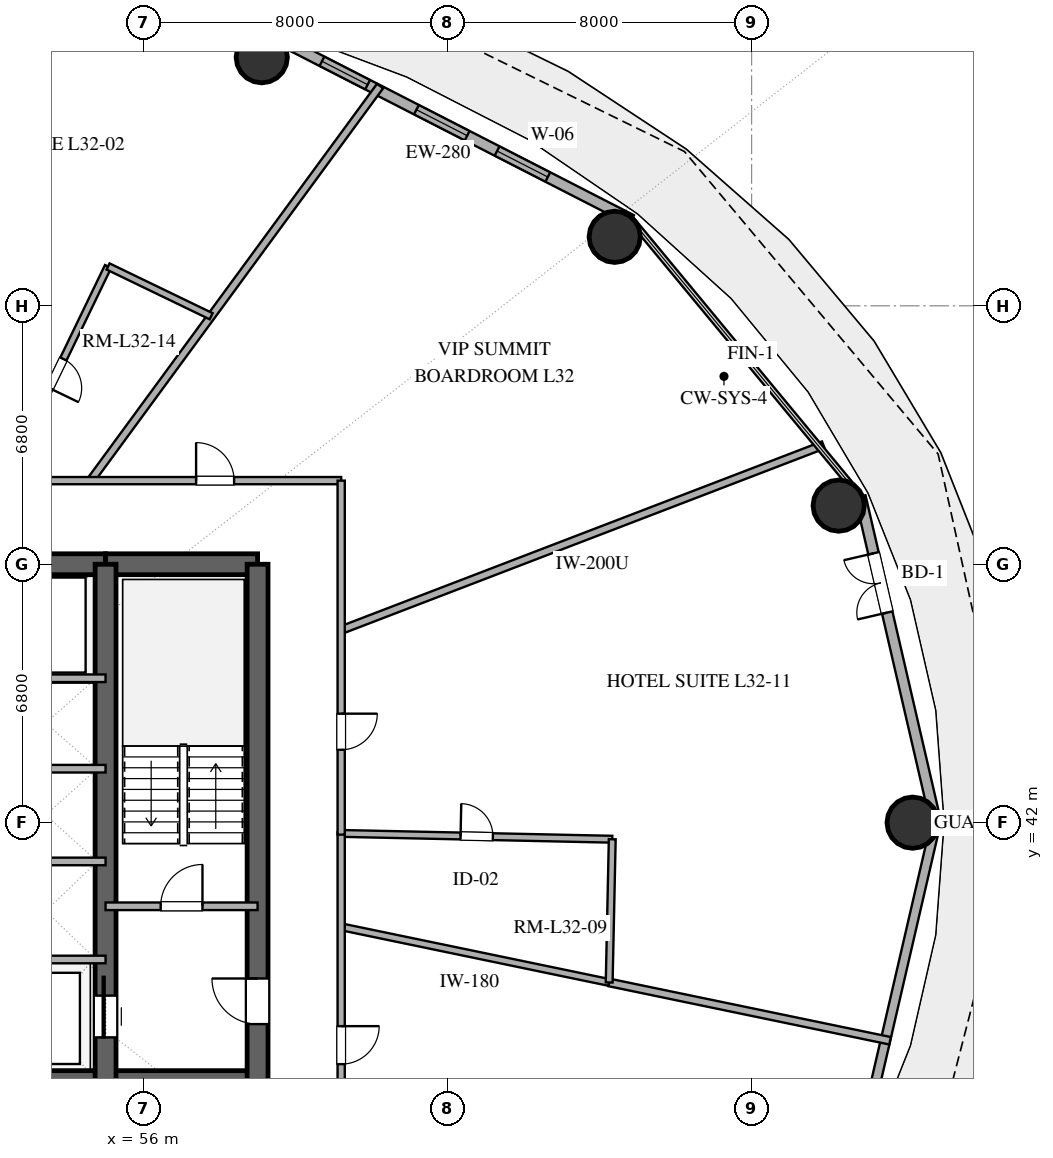
"""IFC4 building model, lengths in metres.
Left out: names, types, materials, properties, quantities, classifications, styles, units other than length and angle.
Written with IfcOpenShell. Run it as: python <this file> out.ifc"""

import sys

from ifc_helpers import new_model, si_unit, direction, frame, frame_2d, origin, origin_2d, place, context, subcontext, project, spatial, rectangle, hollow_circle, extrude, element, fill, save


model = new_model("IFC4")
c1 = context("Model", 3, precision=1e-05, world=origin(), true_north=direction((0.0, 1.0)))
c2 = subcontext(c1, "Body", "Model", "MODEL_VIEW")
j1 = project(units=[si_unit("LENGTHUNIT", "METRE"), si_unit("PLANEANGLEUNIT", "RADIAN")], contexts=[c1])
p1 = place(None, origin())
s1 = spatial("IfcSite", under=j1, at=p1, CompositionType="ELEMENT")
p2 = place(p1, origin())
s2 = spatial("IfcBuilding", under=s1, at=p2, CompositionType="ELEMENT")
p3 = place(p2, frame((0.0, 0.0, 127.2)))
s3 = spatial("IfcBuildingStorey", under=s2, at=p3, CompositionType="ELEMENT", Elevation=127.2)
p4 = place(p3, frame((41.0, 35.2, 0.0), z_axis=(0.0, 0.0, 1.0), x_axis=(1.0, 0.0, 0.0)))
e1 = element("IfcWall", 1, at=p4, inside=s3, PredefinedType="SHEAR", context=c2, shape_type="SweptSolid", body=[
    extrude(rectangle(XDim=14.0, YDim=0.55, at=frame_2d((7.0, 0.0))), origin(), (0.0, 0.0, 1.0), 3.38),
])
p5 = place(p4, frame((6.1, 0.0, 0.0)))
e2 = element("IfcOpeningElement", 2, at=p5, cuts=e1, PredefinedType="OPENING", context=c2, shape_type="SweptSolid", body=[
    extrude(rectangle(XDim=1.8, YDim=2.25, at=frame_2d((0.9, 1.125))), frame((0.0, 0.285, 0.0), z_axis=(0.0, -1.0, 0.0), x_axis=(1.0, 0.0, 0.0)), (0.0, 0.0, 1.0), 0.57),
])
p6 = place(p3, frame((55.0, 35.2, 0.0), z_axis=(0.0, 0.0, 1.0), x_axis=(1.0, 0.0, 0.0)))
e3 = element("IfcWall", 3, at=p6, inside=s3, PredefinedType="SHEAR", context=c2, shape_type="SweptSolid", body=[
    extrude(rectangle(XDim=4.0, YDim=0.55, at=frame_2d((2.0, 0.0))), origin(), (0.0, 0.0, 1.0), 3.38),
])
p7 = place(p3, frame((41.0, 48.8, 0.0), z_axis=(0.0, 0.0, 1.0), x_axis=(1.0, 0.0, 0.0)))
e4 = element("IfcWall", 4, at=p7, inside=s3, PredefinedType="SHEAR", context=c2, shape_type="SweptSolid", body=[
    extrude(rectangle(XDim=14.0, YDim=0.55, at=frame_2d((7.0, 0.0))), origin(), (0.0, 0.0, 1.0), 3.38),
])
p8 = place(p7, frame((6.1, 0.0, 0.0)))
e5 = element("IfcOpeningElement", 5, at=p8, cuts=e4, PredefinedType="OPENING", context=c2, shape_type="SweptSolid", body=[
    extrude(rectangle(XDim=1.8, YDim=2.25, at=frame_2d((0.9, 1.125))), frame((0.0, 0.285, 0.0), z_axis=(0.0, -1.0, 0.0), x_axis=(1.0, 0.0, 0.0)), (0.0, 0.0, 1.0), 0.57),
])
p9 = place(p3, frame((55.0, 48.8, 0.0), z_axis=(0.0, 0.0, 1.0), x_axis=(1.0, 0.0, 0.0)))
e6 = element("IfcWall", 6, at=p9, inside=s3, PredefinedType="SHEAR", context=c2, shape_type="SweptSolid", body=[
    extrude(rectangle(XDim=4.0, YDim=0.55, at=frame_2d((2.0, 0.0))), origin(), (0.0, 0.0, 1.0), 3.38),
])
p10 = place(p3, frame((59.0, 35.2, 0.0), z_axis=(0.0, 0.0, 1.0), x_axis=(0.0, 1.0, 0.0)))
e7 = element("IfcWall", 7, at=p10, inside=s3, PredefinedType="SHEAR", context=c2, shape_type="SweptSolid", body=[
    extrude(rectangle(XDim=13.6, YDim=0.55, at=frame_2d((6.8, 0.0))), origin(), (0.0, 0.0, 1.0), 3.38),
])
p11 = place(p10, frame((1.5, 0.0, 0.0)))
e8 = element("IfcOpeningElement", 8, at=p11, cuts=e7, PredefinedType="OPENING", context=c2, shape_type="SweptSolid", body=[
    extrude(rectangle(XDim=1.2, YDim=2.15, at=frame_2d((0.6, 1.075))), frame((0.0, 0.285, 0.0), z_axis=(0.0, -1.0, 0.0), x_axis=(1.0, 0.0, 0.0)), (0.0, 0.0, 1.0), 0.57),
])
p12 = place(p3, frame((55.0, 35.2, 0.0), z_axis=(0.0, 0.0, 1.0), x_axis=(0.0, 1.0, 0.0)))
e9 = element("IfcWall", 9, at=p12, inside=s3, PredefinedType="SHEAR", context=c2, shape_type="SweptSolid", body=[
    extrude(rectangle(XDim=13.6, YDim=0.55, at=frame_2d((6.8, 0.0))), origin(), (0.0, 0.0, 1.0), 3.38),
])
p13 = place(p12, frame((1.15, 0.0, 0.0)))
e10 = element("IfcOpeningElement", 10, at=p13, cuts=e9, PredefinedType="OPENING", context=c2, shape_type="SweptSolid", body=[
    extrude(rectangle(XDim=1.1, YDim=2.2, at=frame_2d((0.55, 1.1))), frame((0.0, 0.285, 0.0), z_axis=(0.0, -1.0, 0.0), x_axis=(1.0, 0.0, 0.0)), (0.0, 0.0, 1.0), 0.57),
])
for number, where, z_axis, x_axis in (
    (11, (76.237, 42.0, 0.0), (0.0, 0.0, 1.0), (1.0, 0.0, 0.0)),
    (12, (74.291, 50.343, 0.0), (0.0, 0.0, 1.0), (1.0, 0.0, 0.0)),
    (13, (68.398, 57.415, 0.0), (0.0, 0.0, 1.0), (1.0, 0.0, 0.0)),
    (14, (59.11, 62.141, 0.0), (0.0, 0.0, 1.0), (1.0, 0.0, 0.0)),
):
    element("IfcColumn", number, at=place(p3, frame(where, z_axis=z_axis, x_axis=x_axis)), inside=s3, PredefinedType="COLUMN", context=c2, shape_type="SweptSolid", body=[
        extrude(hollow_circle(Radius=0.675, WallThickness=0.036, at=origin_2d()), origin(), (0.0, 0.0, 1.0), 3.38),
    ])
p14 = place(p3, frame((76.849, 42.0, 0.0), z_axis=(0.0, 0.0, 1.0), x_axis=(-0.22558597182, 0.974223264616, 0.0)))
e15 = element("IfcWall", 15, at=p14, inside=s3, PredefinedType="SOLIDWALL", context=c2, shape_type="SweptSolid", body=[
    extrude(rectangle(XDim=8.811, YDim=0.28, at=frame_2d((4.405, 0.0))), origin(), (0.0, 0.0, 1.0), 3.38),
])
p15 = place(p14, frame((5.675, 0.0, 0.0)))
e16 = element("IfcOpeningElement", 16, at=p15, cuts=e15, PredefinedType="OPENING", context=c2, shape_type="SweptSolid", body=[
    extrude(rectangle(XDim=1.6, YDim=2.25, at=frame_2d((0.8, 1.125))), frame((0.0, 0.15, 0.0), z_axis=(0.0, -1.0, 0.0), x_axis=(1.0, 0.0, 0.0)), (0.0, 0.0, 1.0), 0.3),
])
p16 = place(p3, frame((68.84, 57.86, 0.0), z_axis=(0.0, 0.0, 1.0), x_axis=(-0.889959505023, 0.45603955905, 0.0)))
e17 = element("IfcWall", 17, at=p16, inside=s3, PredefinedType="SOLIDWALL", context=c2, shape_type="SweptSolid", body=[
    extrude(rectangle(XDim=10.662, YDim=0.28, at=frame_2d((5.331, 0.0))), origin(), (0.0, 0.0, 1.0), 3.38),
])
p17 = place(p16, frame((2.475, 0.0, 0.85)))
e18 = element("IfcOpeningElement", 18, at=p17, cuts=e17, PredefinedType="OPENING", context=c2, shape_type="SweptSolid", body=[
    extrude(rectangle(XDim=1.5, YDim=2.0, at=frame_2d((0.75, 1.0))), frame((0.0, 0.15, 0.0), z_axis=(0.0, -1.0, 0.0), x_axis=(1.0, 0.0, 0.0)), (0.0, 0.0, 1.0), 0.3),
])
p18 = place(p16, frame((4.86, 0.0, 0.85)))
e19 = element("IfcOpeningElement", 19, at=p18, cuts=e17, PredefinedType="OPENING", context=c2, shape_type="SweptSolid", body=[
    extrude(rectangle(XDim=1.5, YDim=2.0, at=frame_2d((0.75, 1.0))), frame((0.0, 0.15, 0.0), z_axis=(0.0, -1.0, 0.0), x_axis=(1.0, 0.0, 0.0)), (0.0, 0.0, 1.0), 0.3),
])
p19 = place(p16, frame((7.803, 0.0, 0.85)))
e20 = element("IfcOpeningElement", 20, at=p19, cuts=e17, PredefinedType="OPENING", context=c2, shape_type="SweptSolid", body=[
    extrude(rectangle(XDim=1.35, YDim=1.8, at=frame_2d((0.675, 0.9))), frame((0.0, 0.15, 0.0), z_axis=(0.0, -1.0, 0.0), x_axis=(1.0, 0.0, 0.0)), (0.0, 0.0, 1.0), 0.3),
])
p20 = place(p3, frame((74.861, 33.417, 0.0), z_axis=(0.0, 0.0, 1.0), x_axis=(0.22558597182, 0.974223264616, 0.0)))
e21 = element("IfcWall", 21, at=p20, inside=s3, PredefinedType="SOLIDWALL", context=c2, shape_type="SweptSolid", body=[
    extrude(rectangle(XDim=8.811, YDim=0.25, at=frame_2d((4.405, 0.0))), origin(), (0.0, 0.0, 1.0), 3.38),
])
p21 = place(p3, frame((55.0, 39.8, 0.0), z_axis=(0.0, 0.0, 1.0), x_axis=(1.0, 0.0, 0.0)))
e22 = element("IfcWall", 22, at=p21, inside=s3, PredefinedType="SOLIDWALL", context=c2, shape_type="SweptSolid", body=[
    extrude(rectangle(XDim=4.0, YDim=0.2, at=frame_2d((2.0, 0.0))), origin(), (0.0, 0.0, 1.0), 2.74),
])
p22 = place(p21, frame((1.45, 0.0, 0.0)))
e23 = element("IfcOpeningElement", 23, at=p22, cuts=e22, PredefinedType="OPENING", context=c2, shape_type="SweptSolid", body=[
    extrude(rectangle(XDim=1.1, YDim=2.15, at=frame_2d((0.55, 1.075))), frame((0.0, 0.11, 0.0), z_axis=(0.0, -1.0, 0.0), x_axis=(1.0, 0.0, 0.0)), (0.0, 0.0, 1.0), 0.22),
])
for number, where, z_axis, x_axis in (
    (24, (52.05, 38.4, 0.0), (0.0, 0.0, 1.0), (1.0, 0.0, 0.0)),
    (25, (52.05, 40.98, 0.0), (0.0, 0.0, 1.0), (1.0, 0.0, 0.0)),
    (26, (52.05, 43.42, 0.0), (0.0, 0.0, 1.0), (1.0, 0.0, 0.0)),
    (27, (52.05, 45.8, 0.0), (0.0, 0.0, 1.0), (1.0, 0.0, 0.0)),
):
    element("IfcWall", number, at=place(p3, frame(where, z_axis=z_axis, x_axis=x_axis)), inside=s3, PredefinedType="SOLIDWALL", context=c2, shape_type="SweptSolid", body=[
        extrude(rectangle(XDim=2.95, YDim=0.2, at=frame_2d((1.475, 0.0))), origin(), (0.0, 0.0, 1.0), 2.74),
    ])
p23 = place(p3, frame((73.888, 51.938, 0.0), z_axis=(0.0, 0.0, 1.0), x_axis=(-0.933575508152, -0.358380762009, 0.0)))
e28 = element("IfcWall", 28, at=p23, inside=s3, PredefinedType="PARTITIONING", context=c2, shape_type="SweptSolid", body=[
    extrude(rectangle(XDim=13.591, YDim=0.2, at=frame_2d((6.796, 0.0))), origin(), (0.0, 0.0, 1.0), 2.74),
])
p24 = place(p3, frame((75.643, 36.262, 0.0), z_axis=(0.0, 0.0, 1.0), x_axis=(-0.979129223201, 0.203238687937, 0.0)))
e29 = element("IfcWall", 29, at=p24, inside=s3, PredefinedType="PARTITIONING", context=c2, shape_type="SweptSolid", body=[
    extrude(rectangle(XDim=7.549, YDim=0.2, at=frame_2d((3.774, 0.0))), origin(), (0.0, 0.0, 1.0), 2.74),
])
p25 = place(p3, frame((54.605, 51.0, 0.0), z_axis=(0.0, 0.0, 1.0), x_axis=(0.591626609971, 0.806212102597, 0.0)))
e30 = element("IfcWall", 30, at=p25, inside=s3, PredefinedType="PARTITIONING", context=c2, shape_type="SweptSolid", body=[
    extrude(rectangle(XDim=12.879, YDim=0.2, at=frame_2d((6.439, 0.0))), origin(), (0.0, 0.0, 1.0), 2.74),
])
p26 = place(p3, frame((68.252, 37.796, 0.0), z_axis=(0.0, 0.0, 1.0), x_axis=(-0.979121746523, 0.20327470449, 0.0)))
e31 = element("IfcWall", 31, at=p26, inside=s3, PredefinedType="PLUMBINGWALL", context=c2, shape_type="SweptSolid", body=[
    extrude(rectangle(XDim=7.203, YDim=0.18, at=frame_2d((3.601, 0.0))), origin(), (0.0, 0.0, 1.0), 2.74),
])
p27 = place(p3, frame((61.2, 41.717, 0.0), z_axis=(0.0, 0.0, 1.0), x_axis=(0.999770544785, -0.021420965911, 0.0)))
e32 = element("IfcWall", 32, at=p27, inside=s3, PredefinedType="PLUMBINGWALL", context=c2, shape_type="SweptSolid", body=[
    extrude(rectangle(XDim=7.135, YDim=0.18, at=frame_2d((3.567, 0.0))), origin(), (0.0, 0.0, 1.0), 2.74),
])
p28 = place(p27, frame((3.142, 0.0, 0.0)))
e33 = element("IfcOpeningElement", 33, at=p28, cuts=e32, PredefinedType="OPENING", context=c2, shape_type="SweptSolid", body=[
    extrude(rectangle(XDim=0.85, YDim=2.1, at=frame_2d((0.425, 1.05))), frame((0.0, 0.1, 0.0), z_axis=(0.0, -1.0, 0.0), x_axis=(1.0, 0.0, 0.0)), (0.0, 0.0, 1.0), 0.2),
])
p29 = place(p3, frame((52.31, 51.0, 0.0), z_axis=(0.0, 0.0, 1.0), x_axis=(1.0, 0.0, 0.0)))
e34 = element("IfcWall", 34, at=p29, inside=s3, PredefinedType="PARTITIONING", context=c2, shape_type="SweptSolid", body=[
    extrude(rectangle(XDim=8.89, YDim=0.19, at=frame_2d((4.445, 0.0))), origin(), (0.0, 0.0, 1.0), 2.74),
])
p30 = place(p29, frame((5.073, 0.0, 0.0)))
e35 = element("IfcOpeningElement", 35, at=p30, cuts=e34, PredefinedType="OPENING", context=c2, shape_type="SweptSolid", body=[
    extrude(rectangle(XDim=1.0, YDim=2.2, at=frame_2d((0.5, 1.1))), frame((0.0, 0.105, 0.0), z_axis=(0.0, -1.0, 0.0), x_axis=(1.0, 0.0, 0.0)), (0.0, 0.0, 1.0), 0.21),
])
p31 = place(p3, frame((61.2, 41.749, 0.0), z_axis=(0.0, 0.0, 1.0), x_axis=(0.0, -1.0, 0.0)))
e36 = element("IfcWall", 36, at=p31, inside=s3, PredefinedType="PARTITIONING", context=c2, shape_type="SweptSolid", body=[
    extrude(rectangle(XDim=8.749, YDim=0.19, at=frame_2d((4.375, 0.0))), origin(), (0.0, 0.0, 1.0), 2.74),
])
p32 = place(p31, frame((5.103, 0.0, 0.0)))
e37 = element("IfcOpeningElement", 37, at=p32, cuts=e36, PredefinedType="OPENING", context=c2, shape_type="SweptSolid", body=[
    extrude(rectangle(XDim=1.0, YDim=2.2, at=frame_2d((0.5, 1.1))), frame((0.0, 0.105, 0.0), z_axis=(0.0, -1.0, 0.0), x_axis=(1.0, 0.0, 0.0)), (0.0, 0.0, 1.0), 0.21),
])
p33 = place(p3, frame((55.066, 56.635, 0.0), z_axis=(0.0, 0.0, 1.0), x_axis=(-0.434810168298, -0.900522136066, 0.0)))
e38 = element("IfcWall", 38, at=p33, inside=s3, PredefinedType="PLUMBINGWALL", context=c2, shape_type="SweptSolid", body=[
    extrude(rectangle(XDim=6.257, YDim=0.18, at=frame_2d((3.129, 0.0))), origin(), (0.0, 0.0, 1.0), 2.74),
])
p34 = place(p33, frame((2.704, 0.0, 0.0)))
e39 = element("IfcOpeningElement", 39, at=p34, cuts=e38, PredefinedType="OPENING", context=c2, shape_type="SweptSolid", body=[
    extrude(rectangle(XDim=0.85, YDim=2.1, at=frame_2d((0.425, 1.05))), frame((0.0, 0.1, 0.0), z_axis=(0.0, -1.0, 0.0), x_axis=(1.0, 0.0, 0.0)), (0.0, 0.0, 1.0), 0.2),
])
p35 = place(p3, frame((61.2, 51.0, 0.0), z_axis=(0.0, 0.0, 1.0), x_axis=(0.0, -1.0, 0.0)))
e40 = element("IfcWall", 40, at=p35, inside=s3, PredefinedType="PARTITIONING", context=c2, shape_type="SweptSolid", body=[
    extrude(rectangle(XDim=9.315, YDim=0.19, at=frame_2d((4.657, 0.0))), origin(), (0.0, 0.0, 1.0), 2.74),
])
p36 = place(p35, frame((6.132, 0.0, 0.0)))
e41 = element("IfcOpeningElement", 41, at=p36, cuts=e40, PredefinedType="OPENING", context=c2, shape_type="SweptSolid", body=[
    extrude(rectangle(XDim=0.95, YDim=2.15, at=frame_2d((0.475, 1.075))), frame((0.0, 0.105, 0.0), z_axis=(0.0, -1.0, 0.0), x_axis=(1.0, 0.0, 0.0)), (0.0, 0.0, 1.0), 0.21),
])
p37 = place(p3, frame((68.333, 41.564, 0.0), z_axis=(0.0, 0.0, 1.0), x_axis=(-0.021438450782, -0.999770170003, 0.0)))
e42 = element("IfcWall", 42, at=p37, inside=s3, PredefinedType="PLUMBINGWALL", context=c2, shape_type="SweptSolid", body=[
    extrude(rectangle(XDim=3.77, YDim=0.18, at=frame_2d((1.885, 0.0))), origin(), (0.0, 0.0, 1.0), 2.74),
])
p38 = place(p3, frame((57.779, 55.325, 0.0), z_axis=(0.0, 0.0, 1.0), x_axis=(-0.900534126875, 0.434785333623, 0.0)))
e43 = element("IfcWall", 43, at=p38, inside=s3, PredefinedType="PLUMBINGWALL", context=c2, shape_type="SweptSolid", body=[
    extrude(rectangle(XDim=3.012, YDim=0.18, at=frame_2d((1.506, 0.0))), origin(), (0.0, 0.0, 1.0), 2.74),
])
p39 = place(p15, origin())
e44 = element("IfcDoor", 44, at=p39, inside=s3, OperationType="DOUBLE_DOOR_SINGLE_SWING", PredefinedType="DOOR", context=c2, shape_type="SweptSolid", body=[
    extrude(rectangle(XDim=1.6, YDim=2.25, at=frame_2d((0.8, 1.125))), frame((0.0, 0.025, 0.0), z_axis=(0.0, -1.0, 0.0), x_axis=(1.0, 0.0, 0.0)), (0.0, 0.0, 1.0), 0.05),
])
fill(e16, e44)
p40 = place(p17, origin())
e45 = element("IfcWindow", 45, at=p40, inside=s3, PartitioningType="SINGLE_PANEL", PredefinedType="WINDOW", context=c2, shape_type="SweptSolid", body=[
    extrude(rectangle(XDim=1.5, YDim=2.0, at=frame_2d((0.75, 1.0))), frame((0.0, 0.03, 0.0), z_axis=(0.0, -1.0, 0.0), x_axis=(1.0, 0.0, 0.0)), (0.0, 0.0, 1.0), 0.06),
])
fill(e18, e45)
p41 = place(p18, origin())
e46 = element("IfcWindow", 46, at=p41, inside=s3, PartitioningType="SINGLE_PANEL", PredefinedType="WINDOW", context=c2, shape_type="SweptSolid", body=[
    extrude(rectangle(XDim=1.5, YDim=2.0, at=frame_2d((0.75, 1.0))), frame((0.0, 0.03, 0.0), z_axis=(0.0, -1.0, 0.0), x_axis=(1.0, 0.0, 0.0)), (0.0, 0.0, 1.0), 0.06),
])
fill(e19, e46)
p42 = place(p19, origin())
e47 = element("IfcWindow", 47, at=p42, inside=s3, PartitioningType="SINGLE_PANEL", PredefinedType="WINDOW", context=c2, shape_type="SweptSolid", body=[
    extrude(rectangle(XDim=1.35, YDim=1.8, at=frame_2d((0.675, 0.9))), frame((0.0, 0.03, 0.0), z_axis=(0.0, -1.0, 0.0), x_axis=(1.0, 0.0, 0.0)), (0.0, 0.0, 1.0), 0.06),
])
fill(e20, e47)
p43 = place(p13, origin())
e48 = element("IfcDoor", 48, at=p43, inside=s3, OperationType="SLIDING_TO_RIGHT", PredefinedType="DOOR", context=c2, shape_type="SweptSolid", body=[
    extrude(rectangle(XDim=1.1, YDim=2.2, at=frame_2d((0.55, 1.1))), frame((0.0, 0.025, 0.0), z_axis=(0.0, -1.0, 0.0), x_axis=(1.0, 0.0, 0.0)), (0.0, 0.0, 1.0), 0.05),
])
fill(e10, e48)
p44 = place(p11, origin())
e49 = element("IfcDoor", 49, at=p44, inside=s3, OperationType="SINGLE_SWING_RIGHT", PredefinedType="DOOR", context=c2, shape_type="SweptSolid", body=[
    extrude(rectangle(XDim=1.2, YDim=2.15, at=frame_2d((0.6, 1.075))), frame((0.0, 0.025, 0.0), z_axis=(0.0, -1.0, 0.0), x_axis=(1.0, 0.0, 0.0)), (0.0, 0.0, 1.0), 0.05),
])
fill(e8, e49)
p45 = place(p22, origin())
e50 = element("IfcDoor", 50, at=p45, inside=s3, OperationType="SINGLE_SWING_RIGHT", PredefinedType="DOOR", context=c2, shape_type="SweptSolid", body=[
    extrude(rectangle(XDim=1.1, YDim=2.15, at=frame_2d((0.55, 1.075))), frame((0.0, 0.025, 0.0), z_axis=(0.0, -1.0, 0.0), x_axis=(1.0, 0.0, 0.0)), (0.0, 0.0, 1.0), 0.05),
])
fill(e23, e50)
p46 = place(p28, origin())
e51 = element("IfcDoor", 51, at=p46, inside=s3, OperationType="SINGLE_SWING_LEFT", PredefinedType="DOOR", context=c2, shape_type="SweptSolid", body=[
    extrude(rectangle(XDim=0.85, YDim=2.1, at=frame_2d((0.425, 1.05))), frame((0.0, 0.025, 0.0), z_axis=(0.0, -1.0, 0.0), x_axis=(1.0, 0.0, 0.0)), (0.0, 0.0, 1.0), 0.05),
])
fill(e33, e51)
p47 = place(p30, origin())
e52 = element("IfcDoor", 52, at=p47, inside=s3, OperationType="SINGLE_SWING_LEFT", PredefinedType="DOOR", context=c2, shape_type="SweptSolid", body=[
    extrude(rectangle(XDim=1.0, YDim=2.2, at=frame_2d((0.5, 1.1))), frame((0.0, 0.025, 0.0), z_axis=(0.0, -1.0, 0.0), x_axis=(1.0, 0.0, 0.0)), (0.0, 0.0, 1.0), 0.05),
])
fill(e35, e52)
p48 = place(p32, origin())
e53 = element("IfcDoor", 53, at=p48, inside=s3, OperationType="SINGLE_SWING_LEFT", PredefinedType="DOOR", context=c2, shape_type="SweptSolid", body=[
    extrude(rectangle(XDim=1.0, YDim=2.2, at=frame_2d((0.5, 1.1))), frame((0.0, 0.025, 0.0), z_axis=(0.0, -1.0, 0.0), x_axis=(1.0, 0.0, 0.0)), (0.0, 0.0, 1.0), 0.05),
])
fill(e37, e53)
p49 = place(p34, origin())
e54 = element("IfcDoor", 54, at=p49, inside=s3, OperationType="SINGLE_SWING_RIGHT", PredefinedType="DOOR", context=c2, shape_type="SweptSolid", body=[
    extrude(rectangle(XDim=0.85, YDim=2.1, at=frame_2d((0.425, 1.05))), frame((0.0, 0.025, 0.0), z_axis=(0.0, -1.0, 0.0), x_axis=(1.0, 0.0, 0.0)), (0.0, 0.0, 1.0), 0.05),
])
fill(e39, e54)
p50 = place(p36, origin())
e55 = element("IfcDoor", 55, at=p50, inside=s3, OperationType="SINGLE_SWING_LEFT", PredefinedType="DOOR", context=c2, shape_type="SweptSolid", body=[
    extrude(rectangle(XDim=0.95, YDim=2.15, at=frame_2d((0.475, 1.075))), frame((0.0, 0.025, 0.0), z_axis=(0.0, -1.0, 0.0), x_axis=(1.0, 0.0, 0.0)), (0.0, 0.0, 1.0), 0.05),
])
fill(e41, e55)
save(model, sys.argv[1])
